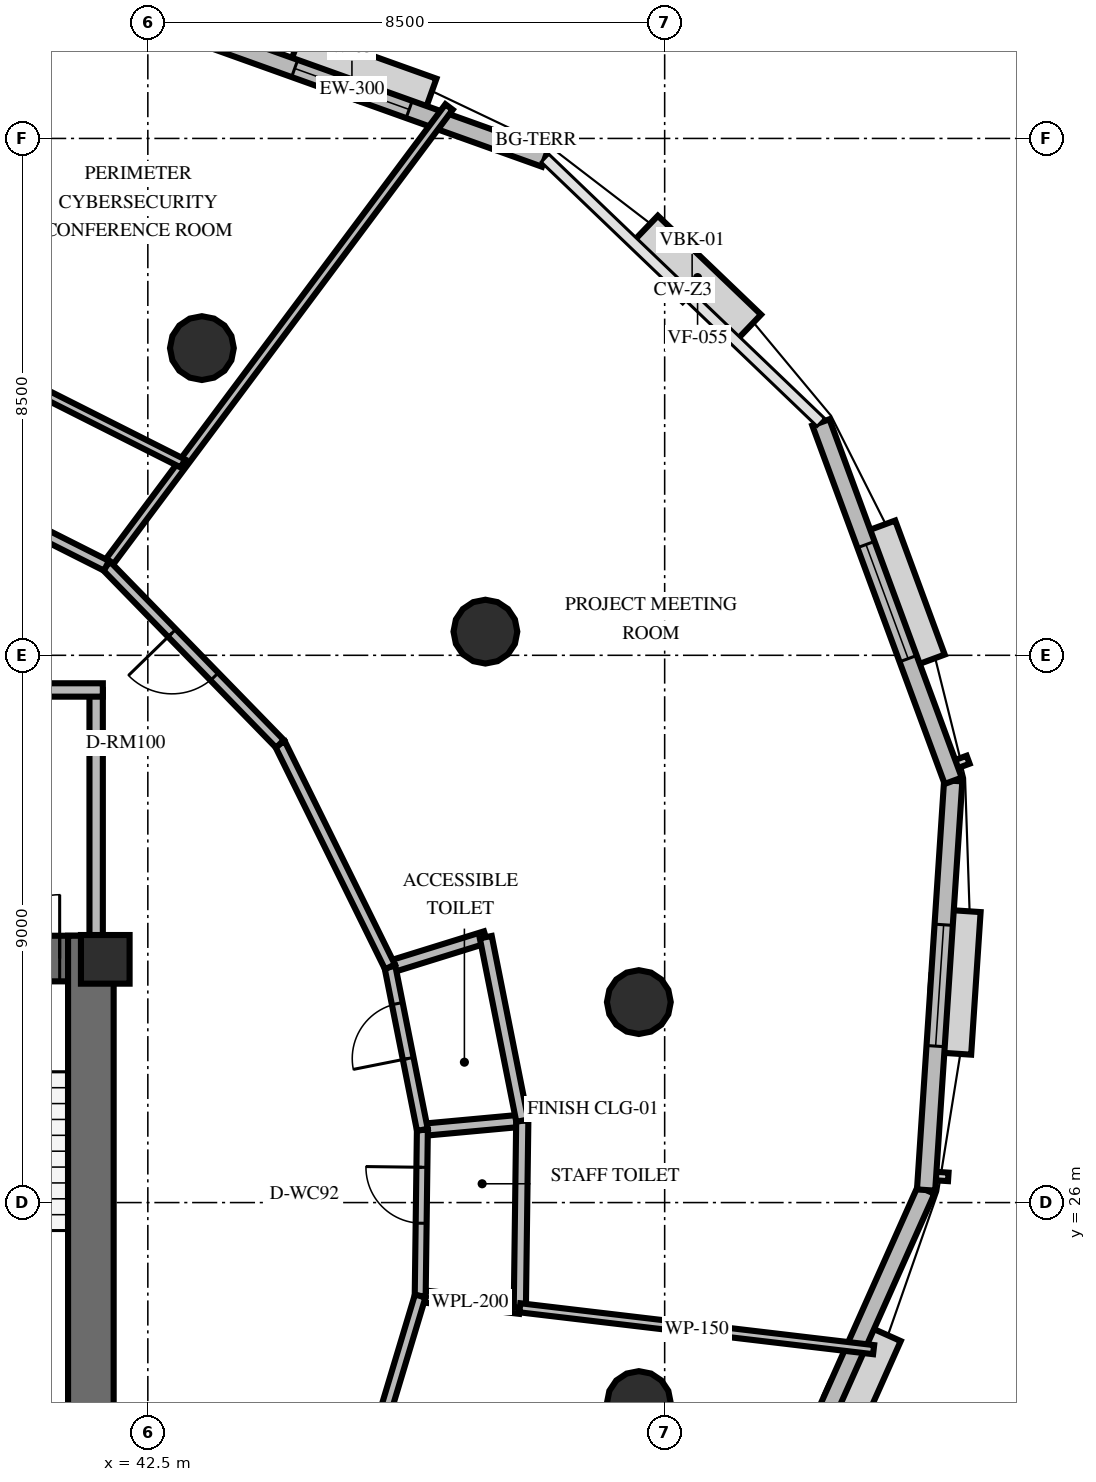
"""IFC4 building model, lengths in metres.
Left out: names, types, materials, properties, quantities, classifications, styles, units other than length and angle.
Written with IfcOpenShell. Run it as: python <this file> out.ifc"""

import sys

from ifc_helpers import new_model, si_unit, direction, frame, frame_2d, origin, origin_2d, place, context, subcontext, project, spatial, rectangle, circle, extrude, element, fill, save


model = new_model("IFC4")
c1 = context("Model", 3, precision=1e-05, world=origin(), true_north=direction((0.0, 1.0)))
c2 = subcontext(c1, "Body", "Model", "MODEL_VIEW")
j1 = project(units=[si_unit("LENGTHUNIT", "METRE"), si_unit("PLANEANGLEUNIT", "RADIAN")], contexts=[c1])
p1 = place(None, origin())
s1 = spatial("IfcSite", under=j1, at=p1, CompositionType="ELEMENT")
p2 = place(p1, origin())
s2 = spatial("IfcBuilding", under=s1, at=p2, CompositionType="ELEMENT")
p3 = place(p2, frame((0.0, 0.0, 173.6)))
s3 = spatial("IfcBuildingStorey", under=s2, at=p3, CompositionType="ELEMENT", Elevation=173.6)
p4 = place(p3, frame((26.072, 30.013, 0.0), z_axis=(0.0, 0.0, 1.0), x_axis=(1.0, 0.0, 0.0)))
e1 = element("IfcWall", 1, at=p4, inside=s3, PredefinedType="SHEAR", context=c2, shape_type="SweptSolid", body=[
    extrude(rectangle(XDim=15.866, YDim=0.75, at=frame_2d((7.933, 0.0))), origin(), (0.0, 0.0, 1.0), 3.6),
])
p5 = place(p4, frame((0.878, 0.0, 0.0)))
e2 = element("IfcOpeningElement", 2, at=p5, cuts=e1, PredefinedType="OPENING", context=c2, shape_type="SweptSolid", body=[
    extrude(rectangle(XDim=1.05, YDim=2.15, at=frame_2d((0.525, 1.075))), frame((0.0, 0.385, 0.0), z_axis=(0.0, -1.0, 0.0), x_axis=(1.0, 0.0, 0.0)), (0.0, 0.0, 1.0), 0.77),
])
p6 = place(p4, frame((13.928, 0.0, 0.0)))
e3 = element("IfcOpeningElement", 3, at=p6, cuts=e1, PredefinedType="OPENING", context=c2, shape_type="SweptSolid", body=[
    extrude(rectangle(XDim=1.05, YDim=2.15, at=frame_2d((0.525, 1.075))), frame((0.0, 0.385, 0.0), z_axis=(0.0, -1.0, 0.0), x_axis=(1.0, 0.0, 0.0)), (0.0, 0.0, 1.0), 0.77),
])
p7 = place(p4, frame((7.378, 0.0, 0.0)))
e4 = element("IfcOpeningElement", 4, at=p7, cuts=e1, PredefinedType="OPENING", context=c2, shape_type="SweptSolid", body=[
    extrude(rectangle(XDim=1.1, YDim=2.15, at=frame_2d((0.55, 1.075))), frame((0.0, 0.385, 0.0), z_axis=(0.0, -1.0, 0.0), x_axis=(1.0, 0.0, 0.0)), (0.0, 0.0, 1.0), 0.77),
])
p8 = place(p3, frame((41.563, 19.812, 0.0), z_axis=(0.0, 0.0, 1.0), x_axis=(0.0, 1.0, 0.0)))
e5 = element("IfcWall", 5, at=p8, inside=s3, PredefinedType="SHEAR", context=c2, shape_type="SweptSolid", body=[
    extrude(rectangle(XDim=10.576, YDim=0.75, at=frame_2d((5.288, 0.0))), origin(), (0.0, 0.0, 1.0), 3.6),
])
p9 = place(p3, frame((41.8, 30.0, 0.0), z_axis=(0.0, 0.0, 1.0), x_axis=(1.0, 0.0, 0.0)))
e6 = element("IfcColumn", 6, at=p9, inside=s3, PredefinedType="PILASTER", context=c2, shape_type="SweptSolid", body=[
    extrude(rectangle(XDim=0.8, YDim=0.8, at=origin_2d()), origin(), (0.0, 0.0, 1.0), 3.6),
])
for number, where, z_axis, x_axis in (
    (7, (50.575, 29.297, 0.0), (0.0, 0.0, 1.0), (1.0, 0.0, 0.0)),
    (8, (48.052, 35.389, 0.0), (0.0, 0.0, 1.0), (1.0, 0.0, 0.0)),
    (9, (43.389, 40.052, 0.0), (0.0, 0.0, 1.0), (1.0, 0.0, 0.0)),
    (10, (50.575, 22.703, 0.0), (0.0, 0.0, 1.0), (1.0, 0.0, 0.0)),
):
    element("IfcColumn", number, at=place(p3, frame(where, z_axis=z_axis, x_axis=x_axis)), inside=s3, PredefinedType="COLUMN", context=c2, shape_type="SweptSolid", body=[
        extrude(circle(Radius=0.525, at=origin_2d()), origin(), (0.0, 0.0, 1.0), 3.6),
    ])
p10 = place(p3, frame((49.032, 43.176, 0.0), z_axis=(0.0, 0.0, 1.0), x_axis=(-0.941435254696, 0.337193803643, 0.0)))
e11 = element("IfcWall", 11, at=p10, inside=s3, PredefinedType="SOLIDWALL", context=c2, shape_type="SweptSolid", body=[
    extrude(rectangle(XDim=6.745, YDim=0.3, at=frame_2d((3.373, 0.0))), origin(), (0.0, 0.0, 1.0), 2.66),
])
p11 = place(p10, frame((2.373, 0.0, 0.8)))
e12 = element("IfcOpeningElement", 12, at=p11, cuts=e11, PredefinedType="OPENING", context=c2, shape_type="SweptSolid", body=[
    extrude(rectangle(XDim=2.0, YDim=1.85, at=frame_2d((1.0, 0.925))), frame((0.0, 0.16, 0.0), z_axis=(0.0, -1.0, 0.0), x_axis=(1.0, 0.0, 0.0)), (0.0, 0.0, 1.0), 0.32),
])
p12 = place(p3, frame((52.284, 19.451, 0.0), z_axis=(0.0, 0.0, 1.0), x_axis=(0.407577130337, 0.913170785136, 0.0)))
e13 = element("IfcWall", 13, at=p12, inside=s3, PredefinedType="SOLIDWALL", context=c2, shape_type="SweptSolid", body=[
    extrude(rectangle(XDim=7.398, YDim=0.3, at=frame_2d((3.699, 0.0))), origin(), (0.0, 0.0, 1.0), 2.66),
])
p13 = place(p12, frame((1.439, 0.0, 0.8)))
e14 = element("IfcOpeningElement", 14, at=p13, cuts=e13, PredefinedType="OPENING", context=c2, shape_type="SweptSolid", body=[
    extrude(rectangle(XDim=2.0, YDim=1.85, at=frame_2d((1.0, 0.925))), frame((0.0, 0.16, 0.0), z_axis=(0.0, -1.0, 0.0), x_axis=(1.0, 0.0, 0.0)), (0.0, 0.0, 1.0), 0.32),
])
p14 = place(p3, frame((55.299, 26.206, 0.0), z_axis=(0.0, 0.0, 1.0), x_axis=(0.066168247178, 0.997808480153, 0.0)))
e15 = element("IfcWall", 15, at=p14, inside=s3, PredefinedType="SOLIDWALL", context=c2, shape_type="SweptSolid", body=[
    extrude(rectangle(XDim=6.745, YDim=0.3, at=frame_2d((3.373, 0.0))), origin(), (0.0, 0.0, 1.0), 2.66),
])
p15 = place(p14, frame((2.372, 0.0, 0.8)))
e16 = element("IfcOpeningElement", 16, at=p15, cuts=e15, PredefinedType="OPENING", context=c2, shape_type="SweptSolid", body=[
    extrude(rectangle(XDim=2.0, YDim=1.85, at=frame_2d((1.0, 0.925))), frame((0.0, 0.16, 0.0), z_axis=(0.0, -1.0, 0.0), x_axis=(1.0, 0.0, 0.0)), (0.0, 0.0, 1.0), 0.32),
])
p16 = place(p3, frame((55.746, 32.936, 0.0), z_axis=(0.0, 0.0, 1.0), x_axis=(-0.346421957123, 0.938078796063, 0.0)))
e17 = element("IfcWall", 17, at=p16, inside=s3, PredefinedType="SOLIDWALL", context=c2, shape_type="SweptSolid", body=[
    extrude(rectangle(XDim=6.283, YDim=0.3, at=frame_2d((3.142, 0.0))), origin(), (0.0, 0.0, 1.0), 2.66),
])
p17 = place(p16, frame((2.141, 0.0, 0.8)))
e18 = element("IfcOpeningElement", 18, at=p17, cuts=e17, PredefinedType="OPENING", context=c2, shape_type="SweptSolid", body=[
    extrude(rectangle(XDim=2.0, YDim=1.85, at=frame_2d((1.0, 0.925))), frame((0.0, 0.16, 0.0), z_axis=(0.0, -1.0, 0.0), x_axis=(1.0, 0.0, 0.0)), (0.0, 0.0, 1.0), 0.32),
])
p18 = place(p3, frame((41.65, 30.05, 0.0), z_axis=(0.0, 0.0, 1.0), x_axis=(0.0, 1.0, 0.0)))
e19 = element("IfcWall", 19, at=p18, inside=s3, PredefinedType="SOLIDWALL", context=c2, shape_type="SweptSolid", body=[
    extrude(rectangle(XDim=4.38, YDim=0.22, at=frame_2d((2.19, 0.0))), origin(), (0.0, 0.0, 1.0), 2.46),
])
p19 = place(p3, frame((37.45, 34.43, 0.0), z_axis=(0.0, 0.0, 1.0), x_axis=(1.0, 0.0, 0.0)))
e20 = element("IfcWall", 20, at=p19, inside=s3, PredefinedType="SOLIDWALL", context=c2, shape_type="SweptSolid", body=[
    extrude(rectangle(XDim=4.31, YDim=0.22, at=frame_2d((2.155, 0.0))), origin(), (0.0, 0.0, 1.0), 2.46),
])
p20 = place(p19, frame((1.6, 0.0, 0.0)))
e21 = element("IfcOpeningElement", 21, at=p20, cuts=e20, PredefinedType="OPENING", context=c2, shape_type="SweptSolid", body=[
    extrude(rectangle(XDim=1.1, YDim=2.15, at=frame_2d((0.55, 1.075))), frame((0.0, 0.12, 0.0), z_axis=(0.0, -1.0, 0.0), x_axis=(1.0, 0.0, 0.0)), (0.0, 0.0, 1.0), 0.24),
])
for number, where, z_axis, x_axis in (
    (22, (46.979, 24.464, 0.0), (0.0, 0.0, 1.0), (0.993, -0.118, 0.0)),
    (23, (47.015, 27.196, 0.0), (0.0, 0.0, 1.0), (0.996, 0.092, 0.0)),
):
    element("IfcWall", number, at=place(p3, frame(where, z_axis=z_axis, x_axis=x_axis)), inside=s3, PredefinedType="PLUMBINGWALL", context=c2, shape_type="SweptSolid", body=[
        extrude(rectangle(XDim=1.65, YDim=0.2, at=frame_2d((0.825, 0.0))), origin(), (0.0, 0.0, 1.0), 2.46),
    ])
p21 = place(p3, frame((48.618, 24.27, 0.0), z_axis=(0.0, 0.0, 1.0), x_axis=(0.013089960589, 0.999914322796, 0.0)))
e24 = element("IfcWall", 24, at=p21, inside=s3, PredefinedType="PLUMBINGWALL", context=c2, shape_type="SweptSolid", body=[
    extrude(rectangle(XDim=3.077, YDim=0.2, at=frame_2d((1.539, 0.0))), origin(), (0.0, 0.0, 1.0), 2.46),
])
p22 = place(p3, frame((46.979, 24.464, 0.0), z_axis=(0.0, 0.0, 1.0), x_axis=(0.013046253309, 0.999914894016, 0.0)))
e25 = element("IfcWall", 25, at=p22, inside=s3, PredefinedType="PARTITIONING", context=c2, shape_type="SweptSolid", body=[
    extrude(rectangle(XDim=2.732, YDim=0.18, at=frame_2d((1.366, 0.0))), origin(), (0.0, 0.0, 1.0), 2.46),
])
p23 = place(p22, frame((1.197, 0.0, 0.0)))
e26 = element("IfcOpeningElement", 26, at=p23, cuts=e25, PredefinedType="OPENING", context=c2, shape_type="SweptSolid", body=[
    extrude(rectangle(XDim=0.92, YDim=2.1, at=frame_2d((0.46, 1.05))), frame((0.0, 0.1, 0.0), z_axis=(0.0, -1.0, 0.0), x_axis=(1.0, 0.0, 0.0)), (0.0, 0.0, 1.0), 0.2),
])
p24 = place(p3, frame((46.482, 29.876, 0.0), z_axis=(0.0, 0.0, 1.0), x_axis=(0.955020793809, 0.296538839602, 0.0)))
e27 = element("IfcWall", 27, at=p24, inside=s3, PredefinedType="PLUMBINGWALL", context=c2, shape_type="SweptSolid", body=[
    extrude(rectangle(XDim=1.65, YDim=0.2, at=frame_2d((0.825, 0.0))), origin(), (0.0, 0.0, 1.0), 2.46),
])
p25 = place(p3, frame((48.658, 27.347, 0.0), z_axis=(0.0, 0.0, 1.0), x_axis=(-0.195093780369, 0.980784592488, 0.0)))
e28 = element("IfcWall", 28, at=p25, inside=s3, PredefinedType="PLUMBINGWALL", context=c2, shape_type="SweptSolid", body=[
    extrude(rectangle(XDim=3.077, YDim=0.2, at=frame_2d((1.539, 0.0))), origin(), (0.0, 0.0, 1.0), 2.46),
])
p26 = place(p3, frame((47.015, 27.196, 0.0), z_axis=(0.0, 0.0, 1.0), x_axis=(-0.195050694418, 0.98079316199, 0.0)))
e29 = element("IfcWall", 29, at=p26, inside=s3, PredefinedType="PARTITIONING", context=c2, shape_type="SweptSolid", body=[
    extrude(rectangle(XDim=2.732, YDim=0.18, at=frame_2d((1.366, 0.0))), origin(), (0.0, 0.0, 1.0), 2.46),
])
p27 = place(p26, frame((1.197, 0.0, 0.0)))
e30 = element("IfcOpeningElement", 30, at=p27, cuts=e29, PredefinedType="OPENING", context=c2, shape_type="SweptSolid", body=[
    extrude(rectangle(XDim=0.92, YDim=2.1, at=frame_2d((0.46, 1.05))), frame((0.0, 0.1, 0.0), z_axis=(0.0, -1.0, 0.0), x_axis=(1.0, 0.0, 0.0)), (0.0, 0.0, 1.0), 0.2),
])
p28 = place(p3, frame((48.618, 24.27, 0.0), z_axis=(0.0, 0.0, 1.0), x_axis=(0.993073026806, -0.117498780548, 0.0)))
e31 = element("IfcWall", 31, at=p28, inside=s3, PredefinedType="PARTITIONING", context=c2, shape_type="SweptSolid", body=[
    extrude(rectangle(XDim=5.859, YDim=0.15, at=frame_2d((2.93, 0.0))), origin(), (0.0, 0.0, 1.0), 2.46),
])
p29 = place(p3, frame((41.82, 36.472, 0.0), z_axis=(0.0, 0.0, 1.0), x_axis=(0.598335177015, 0.801245914777, 0.0)))
e32 = element("IfcWall", 32, at=p29, inside=s3, PredefinedType="PARTITIONING", context=c2, shape_type="SweptSolid", body=[
    extrude(rectangle(XDim=9.416, YDim=0.15, at=frame_2d((4.708, 0.0))), origin(), (0.0, 0.0, 1.0), 2.46),
])
p30 = place(p3, frame((46.482, 29.876, 0.0), z_axis=(0.0, 0.0, 1.0), x_axis=(-0.442287221149, 0.896873465996, 0.0)))
e33 = element("IfcWall", 33, at=p30, inside=s3, PredefinedType="PARTITIONING", context=c2, shape_type="SweptSolid", body=[
    extrude(rectangle(XDim=4.089, YDim=0.18, at=frame_2d((2.044, 0.0))), origin(), (0.0, 0.0, 1.0), 2.46),
])
p31 = place(p3, frame((44.674, 33.543, 0.0), z_axis=(0.0, 0.0, 1.0), x_axis=(-0.697792477358, 0.716299978041, 0.0)))
e34 = element("IfcWall", 34, at=p31, inside=s3, PredefinedType="PARTITIONING", context=c2, shape_type="SweptSolid", body=[
    extrude(rectangle(XDim=4.089, YDim=0.18, at=frame_2d((2.045, 0.0))), origin(), (0.0, 0.0, 1.0), 2.46),
])
p32 = place(p31, frame((1.545, 0.0, 0.0)))
e35 = element("IfcOpeningElement", 35, at=p32, cuts=e34, PredefinedType="OPENING", context=c2, shape_type="SweptSolid", body=[
    extrude(rectangle(XDim=1.0, YDim=2.15, at=frame_2d((0.5, 1.075))), frame((0.0, 0.1, 0.0), z_axis=(0.0, -1.0, 0.0), x_axis=(1.0, 0.0, 0.0)), (0.0, 0.0, 1.0), 0.2),
])
p33 = place(p3, frame((41.82, 36.472, 0.0), z_axis=(0.0, 0.0, 1.0), x_axis=(-0.892991933776, 0.450072667701, 0.0)))
e36 = element("IfcWall", 36, at=p33, inside=s3, PredefinedType="PARTITIONING", context=c2, shape_type="SweptSolid", body=[
    extrude(rectangle(XDim=4.539, YDim=0.18, at=frame_2d((2.27, 0.0))), origin(), (0.0, 0.0, 1.0), 2.46),
])
p34 = place(p33, frame((2.579, 0.0, 0.0)))
e37 = element("IfcOpeningElement", 37, at=p34, cuts=e36, PredefinedType="OPENING", context=c2, shape_type="SweptSolid", body=[
    extrude(rectangle(XDim=1.0, YDim=2.15, at=frame_2d((0.5, 1.075))), frame((0.0, 0.1, 0.0), z_axis=(0.0, -1.0, 0.0), x_axis=(1.0, 0.0, 0.0)), (0.0, 0.0, 1.0), 0.2),
])
p35 = place(p3, frame((43.077, 38.155, 0.0), z_axis=(0.0, 0.0, 1.0), x_axis=(-0.892986088423, 0.450084265313, 0.0)))
e38 = element("IfcWall", 38, at=p35, inside=s3, PredefinedType="PARTITIONING", context=c2, shape_type="SweptSolid", body=[
    extrude(rectangle(XDim=5.269, YDim=0.15, at=frame_2d((2.634, 0.0))), origin(), (0.0, 0.0, 1.0), 2.46),
])
p36 = place(p35, frame((3.149, 0.0, 0.0)))
e39 = element("IfcOpeningElement", 39, at=p36, cuts=e38, PredefinedType="OPENING", context=c2, shape_type="SweptSolid", body=[
    extrude(rectangle(XDim=0.95, YDim=2.15, at=frame_2d((0.475, 1.075))), frame((0.0, 0.085, 0.0), z_axis=(0.0, -1.0, 0.0), x_axis=(1.0, 0.0, 0.0)), (0.0, 0.0, 1.0), 0.17),
])
p37 = place(p3, frame((45.671, 20.117, 0.0), z_axis=(0.0, 0.0, 1.0), x_axis=(0.288226064997, 0.957562392461, 0.0)))
e40 = element("IfcWall", 40, at=p37, inside=s3, PredefinedType="PARTITIONING", context=c2, shape_type="SweptSolid", body=[
    extrude(rectangle(XDim=4.539, YDim=0.18, at=frame_2d((2.27, 0.0))), origin(), (0.0, 0.0, 1.0), 2.46),
])
p38 = place(p37, frame((0.96, 0.0, 0.0)))
e41 = element("IfcOpeningElement", 41, at=p38, cuts=e40, PredefinedType="OPENING", context=c2, shape_type="SweptSolid", body=[
    extrude(rectangle(XDim=1.0, YDim=2.15, at=frame_2d((0.5, 1.075))), frame((0.0, 0.1, 0.0), z_axis=(0.0, -1.0, 0.0), x_axis=(1.0, 0.0, 0.0)), (0.0, 0.0, 1.0), 0.2),
])
p39 = place(p11, origin())
e42 = element("IfcWindow", 42, at=p39, inside=s3, PartitioningType="SINGLE_PANEL", PredefinedType="WINDOW", context=c2, shape_type="SweptSolid", body=[
    extrude(rectangle(XDim=2.0, YDim=1.85, at=frame_2d((1.0, 0.925))), frame((0.0, 0.03, 0.0), z_axis=(0.0, -1.0, 0.0), x_axis=(1.0, 0.0, 0.0)), (0.0, 0.0, 1.0), 0.06),
])
fill(e12, e42)
p40 = place(p15, origin())
e43 = element("IfcWindow", 43, at=p40, inside=s3, PartitioningType="SINGLE_PANEL", PredefinedType="WINDOW", context=c2, shape_type="SweptSolid", body=[
    extrude(rectangle(XDim=2.0, YDim=1.85, at=frame_2d((1.0, 0.925))), frame((0.0, 0.03, 0.0), z_axis=(0.0, -1.0, 0.0), x_axis=(1.0, 0.0, 0.0)), (0.0, 0.0, 1.0), 0.06),
])
fill(e16, e43)
p41 = place(p17, origin())
e44 = element("IfcWindow", 44, at=p41, inside=s3, PartitioningType="SINGLE_PANEL", PredefinedType="WINDOW", context=c2, shape_type="SweptSolid", body=[
    extrude(rectangle(XDim=2.0, YDim=1.85, at=frame_2d((1.0, 0.925))), frame((0.0, 0.03, 0.0), z_axis=(0.0, -1.0, 0.0), x_axis=(1.0, 0.0, 0.0)), (0.0, 0.0, 1.0), 0.06),
])
fill(e18, e44)
p42 = place(p6, origin())
e45 = element("IfcDoor", 45, at=p42, inside=s3, OperationType="SINGLE_SWING_RIGHT", PredefinedType="DOOR", context=c2, shape_type="SweptSolid", body=[
    extrude(rectangle(XDim=1.05, YDim=2.15, at=frame_2d((0.525, 1.075))), frame((0.0, 0.025, 0.0), z_axis=(0.0, -1.0, 0.0), x_axis=(1.0, 0.0, 0.0)), (0.0, 0.0, 1.0), 0.05),
])
fill(e3, e45)
p43 = place(p23, origin())
e46 = element("IfcDoor", 46, at=p43, inside=s3, OperationType="SINGLE_SWING_RIGHT", PredefinedType="DOOR", context=c2, shape_type="SweptSolid", body=[
    extrude(rectangle(XDim=0.92, YDim=2.1, at=frame_2d((0.46, 1.05))), frame((0.0, 0.025, 0.0), z_axis=(0.0, -1.0, 0.0), x_axis=(1.0, 0.0, 0.0)), (0.0, 0.0, 1.0), 0.05),
])
fill(e26, e46)
p44 = place(p27, origin())
e47 = element("IfcDoor", 47, at=p44, inside=s3, OperationType="SINGLE_SWING_LEFT", PredefinedType="DOOR", context=c2, shape_type="SweptSolid", body=[
    extrude(rectangle(XDim=0.92, YDim=2.1, at=frame_2d((0.46, 1.05))), frame((0.0, 0.025, 0.0), z_axis=(0.0, -1.0, 0.0), x_axis=(1.0, 0.0, 0.0)), (0.0, 0.0, 1.0), 0.05),
])
fill(e30, e47)
p45 = place(p32, origin())
e48 = element("IfcDoor", 48, at=p45, inside=s3, OperationType="SINGLE_SWING_RIGHT", PredefinedType="DOOR", context=c2, shape_type="SweptSolid", body=[
    extrude(rectangle(XDim=1.0, YDim=2.15, at=frame_2d((0.5, 1.075))), frame((0.0, 0.025, 0.0), z_axis=(0.0, -1.0, 0.0), x_axis=(1.0, 0.0, 0.0)), (0.0, 0.0, 1.0), 0.05),
])
fill(e35, e48)
save(model, sys.argv[1])
